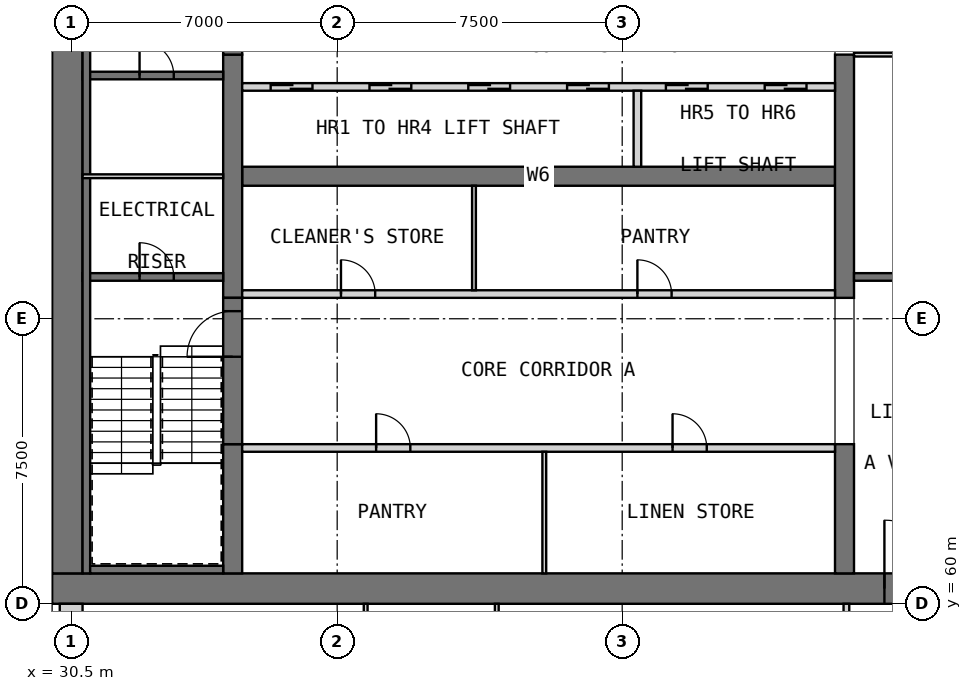
"""IFC4 building model, lengths in metres.
Left out: names, types, materials, properties, quantities, classifications, styles, units other than length and angle.
Written with IfcOpenShell. Run it as: python <this file> out.ifc"""

import sys

from ifc_helpers import new_model, si_unit, direction, frame, frame_2d, origin, place, context, subcontext, project, spatial, rectangle, extrude, element, fill, save


model = new_model("IFC4")
c1 = context("Model", 3, precision=1e-05, world=origin(), true_north=direction((0.0, 1.0)))
c2 = subcontext(c1, "Body", "Model", "MODEL_VIEW")
j1 = project(units=[si_unit("LENGTHUNIT", "METRE"), si_unit("PLANEANGLEUNIT", "RADIAN")], contexts=[c1])
p1 = place(None, origin())
s1 = spatial("IfcSite", under=j1, at=p1, CompositionType="ELEMENT")
p2 = place(p1, origin())
s2 = spatial("IfcBuilding", under=s1, at=p2, CompositionType="ELEMENT")
p3 = place(p2, frame((0.0, 0.0, 162.6)))
s3 = spatial("IfcBuildingStorey", under=s2, at=p3, CompositionType="ELEMENT", Elevation=162.6)
p4 = place(p3, frame((30.0, 60.4, 0.0), z_axis=(0.0, 0.0, 1.0), x_axis=(1.0, 0.0, 0.0)))
e1 = element("IfcWall", 1, at=p4, inside=s3, PredefinedType="SHEAR", context=c2, shape_type="SweptSolid", body=[
    extrude(rectangle(XDim=30.0, YDim=0.8, at=frame_2d((15.0, 0.0))), origin(), (0.0, 0.0, 1.0), 3.6),
])
p5 = place(p4, frame((21.9, 0.0, 0.0)))
e2 = element("IfcOpeningElement", 2, at=p5, cuts=e1, PredefinedType="OPENING", context=c2, shape_type="SweptSolid", body=[
    extrude(rectangle(XDim=1.8, YDim=2.1, at=frame_2d((0.9, 1.05))), frame((0.0, 0.41, 0.0), z_axis=(0.0, -1.0, 0.0), x_axis=(1.0, 0.0, 0.0)), (0.0, 0.0, 1.0), 0.82),
])
p6 = place(p4, frame((26.5, 0.0, 0.0)))
e3 = element("IfcOpeningElement", 3, at=p6, cuts=e1, PredefinedType="OPENING", context=c2, shape_type="SweptSolid", body=[
    extrude(rectangle(XDim=1.2, YDim=2.1, at=frame_2d((0.6, 1.05))), frame((0.0, 0.41, 0.0), z_axis=(0.0, -1.0, 0.0), x_axis=(1.0, 0.0, 0.0)), (0.0, 0.0, 1.0), 0.82),
])
p7 = place(p3, frame((30.4, 60.8, 0.0), z_axis=(0.0, 0.0, 1.0), x_axis=(0.0, 1.0, 0.0)))
e4 = element("IfcWall", 4, at=p7, inside=s3, PredefinedType="SHEAR", context=c2, shape_type="SweptSolid", body=[
    extrude(rectangle(XDim=20.9, YDim=0.8, at=frame_2d((10.45, 0.0))), origin(), (0.0, 0.0, 1.0), 3.6),
])
p8 = place(p3, frame((35.0, 71.25, 0.0), z_axis=(0.0, 0.0, 1.0), x_axis=(1.0, 0.0, 0.0)))
e5 = element("IfcWall", 5, at=p8, inside=s3, PredefinedType="SHEAR", context=c2, shape_type="SweptSolid", body=[
    extrude(rectangle(XDim=15.6, YDim=0.5, at=frame_2d((7.8, 0.0))), origin(), (0.0, 0.0, 1.0), 3.6),
])
p9 = place(p3, frame((34.75, 60.8, 0.0), z_axis=(0.0, 0.0, 1.0), x_axis=(0.0, 1.0, 0.0)))
e6 = element("IfcWall", 6, at=p9, inside=s3, PredefinedType="SHEAR", context=c2, shape_type="SweptSolid", body=[
    extrude(rectangle(XDim=3.4, YDim=0.5, at=frame_2d((1.7, 0.0))), origin(), (0.0, 0.0, 1.0), 3.6),
])
p10 = place(p3, frame((34.75, 68.05, 0.0), z_axis=(0.0, 0.0, 1.0), x_axis=(0.0, 1.0, 0.0)))
e7 = element("IfcWall", 7, at=p10, inside=s3, PredefinedType="SHEAR", context=c2, shape_type="SweptSolid", body=[
    extrude(rectangle(XDim=6.4, YDim=0.5, at=frame_2d((3.2, 0.0))), origin(), (0.0, 0.0, 1.0), 3.6),
])
p11 = place(p3, frame((50.85, 60.8, 0.0), z_axis=(0.0, 0.0, 1.0), x_axis=(0.0, 1.0, 0.0)))
e8 = element("IfcWall", 8, at=p11, inside=s3, PredefinedType="SHEAR", context=c2, shape_type="SweptSolid", body=[
    extrude(rectangle(XDim=3.4, YDim=0.5, at=frame_2d((1.7, 0.0))), origin(), (0.0, 0.0, 1.0), 3.6),
])
p12 = place(p3, frame((50.85, 68.05, 0.0), z_axis=(0.0, 0.0, 1.0), x_axis=(0.0, 1.0, 0.0)))
e9 = element("IfcWall", 9, at=p12, inside=s3, PredefinedType="SHEAR", context=c2, shape_type="SweptSolid", body=[
    extrude(rectangle(XDim=6.4, YDim=0.5, at=frame_2d((3.2, 0.0))), origin(), (0.0, 0.0, 1.0), 3.6),
])
p13 = place(p3, frame((30.5, 60.0, 0.0), z_axis=(0.0, 0.0, 1.0), x_axis=(0.0, -1.0, 0.0)))
e10 = element("IfcWall", 10, at=p13, inside=s3, PredefinedType="SOLIDWALL", context=c2, shape_type="SweptSolid", body=[
    extrude(rectangle(XDim=7.0, YDim=0.6, at=frame_2d((3.5, 0.0))), origin(), (0.0, 0.0, 1.0), 3.2),
])
p14 = place(p13, frame((4.175, 0.0, 0.8)))
e11 = element("IfcOpeningElement", 11, at=p14, cuts=e10, PredefinedType="OPENING", context=c2, shape_type="SweptSolid", body=[
    extrude(rectangle(XDim=2.4, YDim=1.8, at=frame_2d((1.2, 0.9))), frame((0.0, 0.31, 0.0), z_axis=(0.0, -1.0, 0.0), x_axis=(1.0, 0.0, 0.0)), (0.0, 0.0, 1.0), 0.62),
])
p15 = place(p13, frame((0.675, 0.0, 0.8)))
e12 = element("IfcOpeningElement", 12, at=p15, cuts=e10, PredefinedType="OPENING", context=c2, shape_type="SweptSolid", body=[
    extrude(rectangle(XDim=2.4, YDim=1.8, at=frame_2d((1.2, 0.9))), frame((0.0, 0.31, 0.0), z_axis=(0.0, -1.0, 0.0), x_axis=(1.0, 0.0, 0.0)), (0.0, 0.0, 1.0), 0.62),
])
p16 = place(p3, frame((35.0, 64.1, 0.0), z_axis=(0.0, 0.0, 1.0), x_axis=(1.0, 0.0, 0.0)))
e13 = element("IfcWall", 13, at=p16, inside=s3, PredefinedType="PARTITIONING", context=c2, shape_type="SweptSolid", body=[
    extrude(rectangle(XDim=15.6, YDim=0.2, at=frame_2d((7.8, 0.0))), origin(), (0.0, 0.0, 1.0), 3.19),
])
p17 = place(p16, frame((3.525, 0.0, 0.0)))
e14 = element("IfcOpeningElement", 14, at=p17, cuts=e13, PredefinedType="OPENING", context=c2, shape_type="SweptSolid", body=[
    extrude(rectangle(XDim=0.9, YDim=2.1, at=frame_2d((0.45, 1.05))), frame((0.0, 0.11, 0.0), z_axis=(0.0, -1.0, 0.0), x_axis=(1.0, 0.0, 0.0)), (0.0, 0.0, 1.0), 0.22),
])
p18 = place(p16, frame((11.325, 0.0, 0.0)))
e15 = element("IfcOpeningElement", 15, at=p18, cuts=e13, PredefinedType="OPENING", context=c2, shape_type="SweptSolid", body=[
    extrude(rectangle(XDim=0.9, YDim=2.1, at=frame_2d((0.45, 1.05))), frame((0.0, 0.11, 0.0), z_axis=(0.0, -1.0, 0.0), x_axis=(1.0, 0.0, 0.0)), (0.0, 0.0, 1.0), 0.22),
])
p19 = place(p3, frame((42.95, 60.8, 0.0), z_axis=(0.0, 0.0, 1.0), x_axis=(0.0, 1.0, 0.0)))
e16 = element("IfcWall", 16, at=p19, inside=s3, PredefinedType="PARTITIONING", context=c2, shape_type="SweptSolid", body=[
    extrude(rectangle(XDim=3.2, YDim=0.1, at=frame_2d((1.6, 0.0))), origin(), (0.0, 0.0, 1.0), 3.19),
])
p20 = place(p3, frame((35.0, 68.15, 0.0), z_axis=(0.0, 0.0, 1.0), x_axis=(1.0, 0.0, 0.0)))
e17 = element("IfcWall", 17, at=p20, inside=s3, PredefinedType="PARTITIONING", context=c2, shape_type="SweptSolid", body=[
    extrude(rectangle(XDim=15.6, YDim=0.2, at=frame_2d((7.8, 0.0))), origin(), (0.0, 0.0, 1.0), 3.19),
])
p21 = place(p20, frame((2.6, 0.0, 0.0)))
e18 = element("IfcOpeningElement", 18, at=p21, cuts=e17, PredefinedType="OPENING", context=c2, shape_type="SweptSolid", body=[
    extrude(rectangle(XDim=0.9, YDim=2.1, at=frame_2d((0.45, 1.05))), frame((0.0, 0.11, 0.0), z_axis=(0.0, -1.0, 0.0), x_axis=(1.0, 0.0, 0.0)), (0.0, 0.0, 1.0), 0.22),
])
p22 = place(p20, frame((10.4, 0.0, 0.0)))
e19 = element("IfcOpeningElement", 19, at=p22, cuts=e17, PredefinedType="OPENING", context=c2, shape_type="SweptSolid", body=[
    extrude(rectangle(XDim=0.9, YDim=2.1, at=frame_2d((0.45, 1.05))), frame((0.0, 0.11, 0.0), z_axis=(0.0, -1.0, 0.0), x_axis=(1.0, 0.0, 0.0)), (0.0, 0.0, 1.0), 0.22),
])
p23 = place(p3, frame((41.1, 68.25, 0.0), z_axis=(0.0, 0.0, 1.0), x_axis=(0.0, 1.0, 0.0)))
e20 = element("IfcWall", 20, at=p23, inside=s3, PredefinedType="PARTITIONING", context=c2, shape_type="SweptSolid", body=[
    extrude(rectangle(XDim=2.75, YDim=0.1, at=frame_2d((1.375, 0.0))), origin(), (0.0, 0.0, 1.0), 3.19),
])
p24 = place(p3, frame((35.0, 73.6, 0.0), z_axis=(0.0, 0.0, 1.0), x_axis=(1.0, 0.0, 0.0)))
e21 = element("IfcWall", 21, at=p24, inside=s3, PredefinedType="SOLIDWALL", context=c2, shape_type="SweptSolid", body=[
    extrude(rectangle(XDim=15.6, YDim=0.2, at=frame_2d((7.8, 0.0))), origin(), (0.0, 0.0, 1.0), 3.6),
])
p25 = place(p24, frame((0.75, 0.0, 0.0)))
e22 = element("IfcOpeningElement", 22, at=p25, cuts=e21, PredefinedType="OPENING", context=c2, shape_type="SweptSolid", body=[
    extrude(rectangle(XDim=1.1, YDim=2.1, at=frame_2d((0.55, 1.05))), frame((0.0, 0.11, 0.0), z_axis=(0.0, -1.0, 0.0), x_axis=(1.0, 0.0, 0.0)), (0.0, 0.0, 1.0), 0.22),
])
p26 = place(p24, frame((3.35, 0.0, 0.0)))
e23 = element("IfcOpeningElement", 23, at=p26, cuts=e21, PredefinedType="OPENING", context=c2, shape_type="SweptSolid", body=[
    extrude(rectangle(XDim=1.1, YDim=2.1, at=frame_2d((0.55, 1.05))), frame((0.0, 0.11, 0.0), z_axis=(0.0, -1.0, 0.0), x_axis=(1.0, 0.0, 0.0)), (0.0, 0.0, 1.0), 0.22),
])
p27 = place(p24, frame((5.95, 0.0, 0.0)))
e24 = element("IfcOpeningElement", 24, at=p27, cuts=e21, PredefinedType="OPENING", context=c2, shape_type="SweptSolid", body=[
    extrude(rectangle(XDim=1.1, YDim=2.1, at=frame_2d((0.55, 1.05))), frame((0.0, 0.11, 0.0), z_axis=(0.0, -1.0, 0.0), x_axis=(1.0, 0.0, 0.0)), (0.0, 0.0, 1.0), 0.22),
])
p28 = place(p24, frame((8.55, 0.0, 0.0)))
e25 = element("IfcOpeningElement", 25, at=p28, cuts=e21, PredefinedType="OPENING", context=c2, shape_type="SweptSolid", body=[
    extrude(rectangle(XDim=1.1, YDim=2.1, at=frame_2d((0.55, 1.05))), frame((0.0, 0.11, 0.0), z_axis=(0.0, -1.0, 0.0), x_axis=(1.0, 0.0, 0.0)), (0.0, 0.0, 1.0), 0.22),
])
p29 = place(p24, frame((11.15, 0.0, 0.0)))
e26 = element("IfcOpeningElement", 26, at=p29, cuts=e21, PredefinedType="OPENING", context=c2, shape_type="SweptSolid", body=[
    extrude(rectangle(XDim=1.1, YDim=2.1, at=frame_2d((0.55, 1.05))), frame((0.0, 0.11, 0.0), z_axis=(0.0, -1.0, 0.0), x_axis=(1.0, 0.0, 0.0)), (0.0, 0.0, 1.0), 0.22),
])
p30 = place(p24, frame((13.75, 0.0, 0.0)))
e27 = element("IfcOpeningElement", 27, at=p30, cuts=e21, PredefinedType="OPENING", context=c2, shape_type="SweptSolid", body=[
    extrude(rectangle(XDim=1.1, YDim=2.1, at=frame_2d((0.55, 1.05))), frame((0.0, 0.11, 0.0), z_axis=(0.0, -1.0, 0.0), x_axis=(1.0, 0.0, 0.0)), (0.0, 0.0, 1.0), 0.22),
])
p31 = place(p3, frame((45.4, 71.5, 0.0), z_axis=(0.0, 0.0, 1.0), x_axis=(0.0, 1.0, 0.0)))
e28 = element("IfcWall", 28, at=p31, inside=s3, PredefinedType="SOLIDWALL", context=c2, shape_type="SweptSolid", body=[
    extrude(rectangle(XDim=2.0, YDim=0.2, at=frame_2d((1.0, 0.0))), origin(), (0.0, 0.0, 1.0), 3.6),
])
p32 = place(p3, frame((34.75, 64.2, 0.0), z_axis=(0.0, 0.0, 1.0), x_axis=(0.0, 1.0, 0.0)))
e29 = element("IfcWall", 29, at=p32, inside=s3, PredefinedType="SOLIDWALL", context=c2, shape_type="SweptSolid", body=[
    extrude(rectangle(XDim=3.85, YDim=0.5, at=frame_2d((1.925, 0.0))), origin(), (0.0, 0.0, 1.0), 2.4),
])
p33 = place(p32, frame((2.3, 0.0, 0.0)))
e30 = element("IfcOpeningElement", 30, at=p33, cuts=e29, PredefinedType="OPENING", context=c2, shape_type="SweptSolid", body=[
    extrude(rectangle(XDim=1.2, YDim=2.1, at=frame_2d((0.6, 1.05))), frame((0.0, 0.26, 0.0), z_axis=(0.0, -1.0, 0.0), x_axis=(1.0, 0.0, 0.0)), (0.0, 0.0, 1.0), 0.52),
])
p34 = place(p3, frame((34.75, 74.45, 0.0), z_axis=(0.0, 0.0, 1.0), x_axis=(0.0, 1.0, 0.0)))
e31 = element("IfcWall", 31, at=p34, inside=s3, PredefinedType="SOLIDWALL", context=c2, shape_type="SweptSolid", body=[
    extrude(rectangle(XDim=3.85, YDim=0.5, at=frame_2d((1.925, 0.0))), origin(), (0.0, 0.0, 1.0), 2.4),
])
p35 = place(p34, frame((1.0, 0.0, 0.0)))
e32 = element("IfcOpeningElement", 32, at=p35, cuts=e31, PredefinedType="OPENING", context=c2, shape_type="SweptSolid", body=[
    extrude(rectangle(XDim=1.2, YDim=2.1, at=frame_2d((0.6, 1.05))), frame((0.0, 0.26, 0.0), z_axis=(0.0, -1.0, 0.0), x_axis=(1.0, 0.0, 0.0)), (0.0, 0.0, 1.0), 0.52),
])
p36 = place(p3, frame((30.8, 68.6, 0.0), z_axis=(0.0, 0.0, 1.0), x_axis=(1.0, 0.0, 0.0)))
e33 = element("IfcWall", 33, at=p36, inside=s3, PredefinedType="SOLIDWALL", context=c2, shape_type="SweptSolid", body=[
    extrude(rectangle(XDim=3.7, YDim=0.2, at=frame_2d((1.85, 0.0))), origin(), (0.0, 0.0, 1.0), 3.19),
])
p37 = place(p36, frame((1.5, 0.0, 0.0)))
e34 = element("IfcOpeningElement", 34, at=p37, cuts=e33, PredefinedType="OPENING", context=c2, shape_type="SweptSolid", body=[
    extrude(rectangle(XDim=0.9, YDim=2.1, at=frame_2d((0.45, 1.05))), frame((0.0, 0.11, 0.0), z_axis=(0.0, -1.0, 0.0), x_axis=(1.0, 0.0, 0.0)), (0.0, 0.0, 1.0), 0.22),
])
p38 = place(p3, frame((30.8, 73.9, 0.0), z_axis=(0.0, 0.0, 1.0), x_axis=(1.0, 0.0, 0.0)))
e35 = element("IfcWall", 35, at=p38, inside=s3, PredefinedType="SOLIDWALL", context=c2, shape_type="SweptSolid", body=[
    extrude(rectangle(XDim=3.7, YDim=0.2, at=frame_2d((1.85, 0.0))), origin(), (0.0, 0.0, 1.0), 3.19),
])
p39 = place(p38, frame((1.5, 0.0, 0.0)))
e36 = element("IfcOpeningElement", 36, at=p39, cuts=e35, PredefinedType="OPENING", context=c2, shape_type="SweptSolid", body=[
    extrude(rectangle(XDim=0.9, YDim=2.1, at=frame_2d((0.45, 1.05))), frame((0.0, 0.11, 0.0), z_axis=(0.0, -1.0, 0.0), x_axis=(1.0, 0.0, 0.0)), (0.0, 0.0, 1.0), 0.22),
])
p40 = place(p3, frame((51.1, 68.6, 0.0), z_axis=(0.0, 0.0, 1.0), x_axis=(1.0, 0.0, 0.0)))
e37 = element("IfcWall", 37, at=p40, inside=s3, PredefinedType="SOLIDWALL", context=c2, shape_type="SweptSolid", body=[
    extrude(rectangle(XDim=8.1, YDim=0.2, at=frame_2d((4.05, 0.0))), origin(), (0.0, 0.0, 1.0), 3.19),
])
p41 = place(p3, frame((30.9, 60.8, 0.0), z_axis=(0.0, 0.0, 1.0), x_axis=(0.0, 1.0, 0.0)))
e38 = element("IfcWall", 38, at=p41, inside=s3, PredefinedType="SOLIDWALL", context=c2, shape_type="SweptSolid", body=[
    extrude(rectangle(XDim=20.9, YDim=0.2, at=frame_2d((10.45, 0.0))), origin(), (0.0, 0.0, 1.0), 3.19),
])
p42 = place(p3, frame((31.0, 60.9, 0.0), z_axis=(0.0, 0.0, 1.0), x_axis=(1.0, 0.0, 0.0)))
e39 = element("IfcWall", 39, at=p42, inside=s3, PredefinedType="SOLIDWALL", context=c2, shape_type="SweptSolid", body=[
    extrude(rectangle(XDim=3.5, YDim=0.2, at=frame_2d((1.75, 0.0))), origin(), (0.0, 0.0, 1.0), 3.19),
])
p43 = place(p3, frame((30.8, 71.25, 0.0), z_axis=(0.0, 0.0, 1.0), x_axis=(1.0, 0.0, 0.0)))
e40 = element("IfcWall", 40, at=p43, inside=s3, PredefinedType="PARTITIONING", context=c2, shape_type="SweptSolid", body=[
    extrude(rectangle(XDim=3.7, YDim=0.1, at=frame_2d((1.85, 0.0))), origin(), (0.0, 0.0, 1.0), 3.19),
])
p44 = place(p3, frame((51.1, 74.45, 0.0), z_axis=(0.0, 0.0, 1.0), x_axis=(1.0, 0.0, 0.0)))
e41 = element("IfcWall", 41, at=p44, inside=s3, PredefinedType="PARTITIONING", context=c2, shape_type="SweptSolid", body=[
    extrude(rectangle(XDim=8.1, YDim=0.1, at=frame_2d((4.05, 0.0))), origin(), (0.0, 0.0, 1.0), 3.19),
])
p45 = place(p44, frame((3.6, 0.0, 0.0)))
e42 = element("IfcOpeningElement", 42, at=p45, cuts=e41, PredefinedType="OPENING", context=c2, shape_type="SweptSolid", body=[
    extrude(rectangle(XDim=0.9, YDim=2.1, at=frame_2d((0.45, 1.05))), frame((0.0, 0.06, 0.0), z_axis=(0.0, -1.0, 0.0), x_axis=(1.0, 0.0, 0.0)), (0.0, 0.0, 1.0), 0.12),
])
for number, where, z_axis, x_axis in (
    (43, (38.25, 52.575, 0.0), (0.0, 0.0, 1.0), (0.0, 1.0, 0.0)),
    (44, (41.7, 52.575, 0.0), (0.0, 0.0, 1.0), (0.0, 1.0, 0.0)),
):
    element("IfcWall", number, at=place(p3, frame(where, z_axis=z_axis, x_axis=x_axis)), inside=s3, PredefinedType="PARTITIONING", context=c2, shape_type="SweptSolid", body=[
        extrude(rectangle(XDim=7.425, YDim=0.1, at=frame_2d((3.712, 0.0))), origin(), (0.0, 0.0, 1.0), 3.2),
    ])
p46 = place(p3, frame((50.9, 52.575, 0.0), z_axis=(0.0, 0.0, 1.0), x_axis=(0.0, 1.0, 0.0)))
e45 = element("IfcWall", 45, at=p46, inside=s3, PredefinedType="PARTITIONING", context=c2, shape_type="SweptSolid", body=[
    extrude(rectangle(XDim=7.425, YDim=0.15, at=frame_2d((3.712, 0.0))), origin(), (0.0, 0.0, 1.0), 3.2),
])
p47 = place(p17, origin())
e46 = element("IfcDoor", 46, at=p47, inside=s3, OperationType="SINGLE_SWING_RIGHT", PredefinedType="DOOR", context=c2, shape_type="SweptSolid", body=[
    extrude(rectangle(XDim=0.9, YDim=2.1, at=frame_2d((0.45, 1.05))), frame((0.0, 0.025, 0.0), z_axis=(0.0, -1.0, 0.0), x_axis=(1.0, 0.0, 0.0)), (0.0, 0.0, 1.0), 0.05),
])
fill(e14, e46)
p48 = place(p18, origin())
e47 = element("IfcDoor", 47, at=p48, inside=s3, OperationType="SINGLE_SWING_LEFT", PredefinedType="DOOR", context=c2, shape_type="SweptSolid", body=[
    extrude(rectangle(XDim=0.9, YDim=2.1, at=frame_2d((0.45, 1.05))), frame((0.0, 0.025, 0.0), z_axis=(0.0, -1.0, 0.0), x_axis=(1.0, 0.0, 0.0)), (0.0, 0.0, 1.0), 0.05),
])
fill(e15, e47)
p49 = place(p21, origin())
e48 = element("IfcDoor", 48, at=p49, inside=s3, OperationType="SINGLE_SWING_RIGHT", PredefinedType="DOOR", context=c2, shape_type="SweptSolid", body=[
    extrude(rectangle(XDim=0.9, YDim=2.1, at=frame_2d((0.45, 1.05))), frame((0.0, 0.025, 0.0), z_axis=(0.0, -1.0, 0.0), x_axis=(1.0, 0.0, 0.0)), (0.0, 0.0, 1.0), 0.05),
])
fill(e18, e48)
p50 = place(p22, origin())
e49 = element("IfcDoor", 49, at=p50, inside=s3, OperationType="SINGLE_SWING_LEFT", PredefinedType="DOOR", context=c2, shape_type="SweptSolid", body=[
    extrude(rectangle(XDim=0.9, YDim=2.1, at=frame_2d((0.45, 1.05))), frame((0.0, 0.025, 0.0), z_axis=(0.0, -1.0, 0.0), x_axis=(1.0, 0.0, 0.0)), (0.0, 0.0, 1.0), 0.05),
])
fill(e19, e49)
p51 = place(p25, origin())
e50 = element("IfcDoor", 50, at=p51, inside=s3, OperationType="DOUBLE_DOOR_SLIDING", PredefinedType="DOOR", context=c2, shape_type="SweptSolid", body=[
    extrude(rectangle(XDim=1.1, YDim=2.1, at=frame_2d((0.55, 1.05))), frame((0.0, 0.025, 0.0), z_axis=(0.0, -1.0, 0.0), x_axis=(1.0, 0.0, 0.0)), (0.0, 0.0, 1.0), 0.05),
])
fill(e22, e50)
p52 = place(p26, origin())
e51 = element("IfcDoor", 51, at=p52, inside=s3, OperationType="DOUBLE_DOOR_SLIDING", PredefinedType="DOOR", context=c2, shape_type="SweptSolid", body=[
    extrude(rectangle(XDim=1.1, YDim=2.1, at=frame_2d((0.55, 1.05))), frame((0.0, 0.025, 0.0), z_axis=(0.0, -1.0, 0.0), x_axis=(1.0, 0.0, 0.0)), (0.0, 0.0, 1.0), 0.05),
])
fill(e23, e51)
p53 = place(p27, origin())
e52 = element("IfcDoor", 52, at=p53, inside=s3, OperationType="DOUBLE_DOOR_SLIDING", PredefinedType="DOOR", context=c2, shape_type="SweptSolid", body=[
    extrude(rectangle(XDim=1.1, YDim=2.1, at=frame_2d((0.55, 1.05))), frame((0.0, 0.025, 0.0), z_axis=(0.0, -1.0, 0.0), x_axis=(1.0, 0.0, 0.0)), (0.0, 0.0, 1.0), 0.05),
])
fill(e24, e52)
p54 = place(p28, origin())
e53 = element("IfcDoor", 53, at=p54, inside=s3, OperationType="DOUBLE_DOOR_SLIDING", PredefinedType="DOOR", context=c2, shape_type="SweptSolid", body=[
    extrude(rectangle(XDim=1.1, YDim=2.1, at=frame_2d((0.55, 1.05))), frame((0.0, 0.025, 0.0), z_axis=(0.0, -1.0, 0.0), x_axis=(1.0, 0.0, 0.0)), (0.0, 0.0, 1.0), 0.05),
])
fill(e25, e53)
p55 = place(p29, origin())
e54 = element("IfcDoor", 54, at=p55, inside=s3, OperationType="DOUBLE_DOOR_SLIDING", PredefinedType="DOOR", context=c2, shape_type="SweptSolid", body=[
    extrude(rectangle(XDim=1.1, YDim=2.1, at=frame_2d((0.55, 1.05))), frame((0.0, 0.025, 0.0), z_axis=(0.0, -1.0, 0.0), x_axis=(1.0, 0.0, 0.0)), (0.0, 0.0, 1.0), 0.05),
])
fill(e26, e54)
p56 = place(p30, origin())
e55 = element("IfcDoor", 55, at=p56, inside=s3, OperationType="DOUBLE_DOOR_SLIDING", PredefinedType="DOOR", context=c2, shape_type="SweptSolid", body=[
    extrude(rectangle(XDim=1.1, YDim=2.1, at=frame_2d((0.55, 1.05))), frame((0.0, 0.025, 0.0), z_axis=(0.0, -1.0, 0.0), x_axis=(1.0, 0.0, 0.0)), (0.0, 0.0, 1.0), 0.05),
])
fill(e27, e55)
p57 = place(p5, origin())
e56 = element("IfcDoor", 56, at=p57, inside=s3, OperationType="DOUBLE_DOOR_SINGLE_SWING", PredefinedType="DOOR", context=c2, shape_type="SweptSolid", body=[
    extrude(rectangle(XDim=1.8, YDim=2.1, at=frame_2d((0.9, 1.05))), frame((0.0, 0.025, 0.0), z_axis=(0.0, -1.0, 0.0), x_axis=(1.0, 0.0, 0.0)), (0.0, 0.0, 1.0), 0.05),
])
fill(e2, e56)
p58 = place(p33, origin())
e57 = element("IfcDoor", 57, at=p58, inside=s3, OperationType="SINGLE_SWING_LEFT", PredefinedType="DOOR", context=c2, shape_type="SweptSolid", body=[
    extrude(rectangle(XDim=1.2, YDim=2.1, at=frame_2d((0.6, 1.05))), frame((0.0, 0.025, 0.0), z_axis=(0.0, -1.0, 0.0), x_axis=(1.0, 0.0, 0.0)), (0.0, 0.0, 1.0), 0.05),
])
fill(e30, e57)
p59 = place(p37, origin())
e58 = element("IfcDoor", 58, at=p59, inside=s3, OperationType="SINGLE_SWING_LEFT", PredefinedType="DOOR", context=c2, shape_type="SweptSolid", body=[
    extrude(rectangle(XDim=0.9, YDim=2.1, at=frame_2d((0.45, 1.05))), frame((0.0, 0.025, 0.0), z_axis=(0.0, -1.0, 0.0), x_axis=(1.0, 0.0, 0.0)), (0.0, 0.0, 1.0), 0.05),
])
fill(e34, e58)
p60 = place(p39, origin())
e59 = element("IfcDoor", 59, at=p60, inside=s3, OperationType="SINGLE_SWING_RIGHT", PredefinedType="DOOR", context=c2, shape_type="SweptSolid", body=[
    extrude(rectangle(XDim=0.9, YDim=2.1, at=frame_2d((0.45, 1.05))), frame((0.0, 0.025, 0.0), z_axis=(0.0, -1.0, 0.0), x_axis=(1.0, 0.0, 0.0)), (0.0, 0.0, 1.0), 0.05),
])
fill(e36, e59)
save(model, sys.argv[1])
